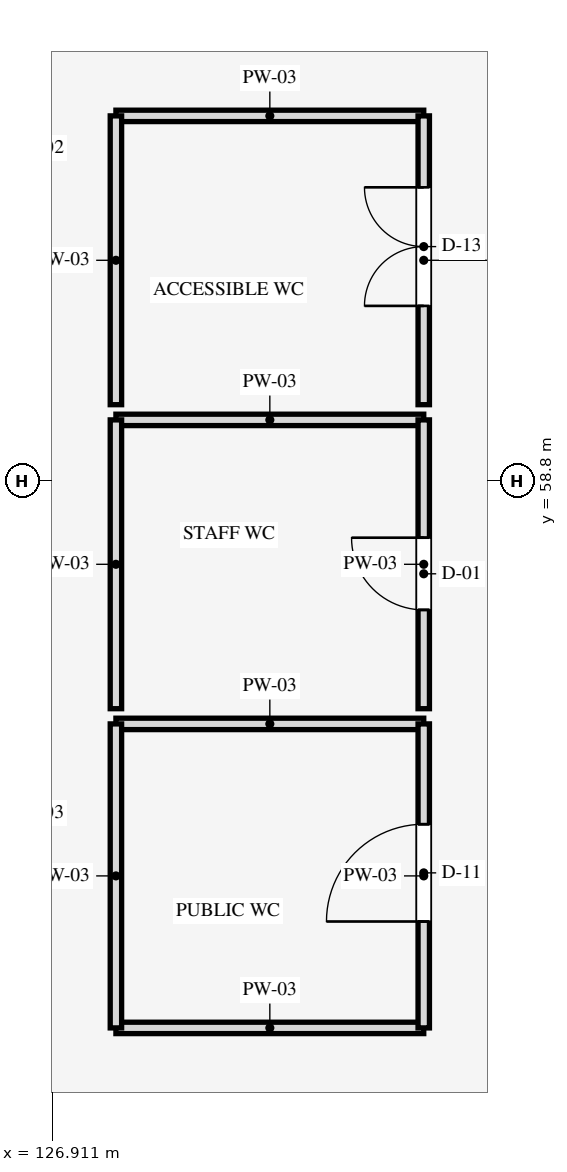
"""IFC4 building model, lengths in metres.
Left out: names, types, materials, properties, quantities, classifications, styles, units other than length and angle.
Written with IfcOpenShell. Run it as: python <this file> out.ifc"""

import sys

from ifc_helpers import new_model, si_unit, direction, frame, frame_2d, origin, place, context, subcontext, project, spatial, rectangle, extrude, element, fill, save


model = new_model("IFC4")
c1 = context("Model", 3, precision=1e-05, world=origin(), true_north=direction((0.0, 1.0)))
c2 = subcontext(c1, "Body", "Model", "MODEL_VIEW")
j1 = project(units=[si_unit("LENGTHUNIT", "METRE"), si_unit("PLANEANGLEUNIT", "RADIAN")], contexts=[c1])
p1 = place(None, origin())
s1 = spatial("IfcSite", under=j1, at=p1, CompositionType="ELEMENT")
p2 = place(p1, origin())
s2 = spatial("IfcBuilding", under=s1, at=p2, CompositionType="ELEMENT")
p3 = place(p2, frame((0.0, 0.0, 32.1)))
s3 = spatial("IfcBuildingStorey", under=s2, at=p3, CompositionType="ELEMENT", Elevation=32.1)
for number, where, z_axis, x_axis in (
    (1, (127.75, 51.6, 0.0), (0.0, 0.0, 1.0), (1.0, 0.0, 0.0)),
    (2, (127.75, 55.6, 0.0), (0.0, 0.0, 1.0), (1.0, 0.0, 0.0)),
):
    element("IfcWall", number, at=place(p3, frame(where, z_axis=z_axis, x_axis=x_axis)), inside=s3, PredefinedType="PARTITIONING", context=c2, shape_type="SweptSolid", body=[
        extrude(rectangle(XDim=4.05, YDim=0.15, at=frame_2d((2.025, 0.0))), origin(), (0.0, 0.0, 1.0), 3.24),
    ])
p4 = place(p3, frame((127.75, 51.6, 0.0), z_axis=(0.0, 0.0, 1.0), x_axis=(0.0, 1.0, 0.0)))
e3 = element("IfcWall", 3, at=p4, inside=s3, PredefinedType="PARTITIONING", context=c2, shape_type="SweptSolid", body=[
    extrude(rectangle(XDim=4.0, YDim=0.15, at=frame_2d((2.0, 0.0))), origin(), (0.0, 0.0, 1.0), 3.24),
])
p5 = place(p3, frame((131.8, 51.6, 0.0), z_axis=(0.0, 0.0, 1.0), x_axis=(0.0, 1.0, 0.0)))
e4 = element("IfcWall", 4, at=p5, inside=s3, PredefinedType="PARTITIONING", context=c2, shape_type="SweptSolid", body=[
    extrude(rectangle(XDim=4.0, YDim=0.15, at=frame_2d((2.0, 0.0))), origin(), (0.0, 0.0, 1.0), 3.24),
])
p6 = place(p5, frame((1.4, 0.0, 0.0)))
e5 = element("IfcOpeningElement", 5, at=p6, cuts=e4, PredefinedType="OPENING", context=c2, shape_type="SweptSolid", body=[
    extrude(rectangle(XDim=1.28, YDim=2.16, at=frame_2d((0.64, 1.08))), frame((0.0, 0.085, 0.0), z_axis=(0.0, -1.0, 0.0), x_axis=(1.0, 0.0, 0.0)), (0.0, 0.0, 1.0), 0.17),
])
p7 = place(p3, frame((127.75, 59.6, 0.0), z_axis=(0.0, 0.0, 1.0), x_axis=(1.0, 0.0, 0.0)))
e6 = element("IfcWall", 6, at=p7, inside=s3, PredefinedType="PARTITIONING", context=c2, shape_type="SweptSolid", body=[
    extrude(rectangle(XDim=4.05, YDim=0.15, at=frame_2d((2.025, 0.0))), origin(), (0.0, 0.0, 1.0), 3.24),
])
p8 = place(p3, frame((127.75, 55.8, 0.0), z_axis=(0.0, 0.0, 1.0), x_axis=(0.0, 1.0, 0.0)))
e7 = element("IfcWall", 7, at=p8, inside=s3, PredefinedType="PARTITIONING", context=c2, shape_type="SweptSolid", body=[
    extrude(rectangle(XDim=3.8, YDim=0.15, at=frame_2d((1.9, 0.0))), origin(), (0.0, 0.0, 1.0), 3.24),
])
p9 = place(p3, frame((131.8, 55.8, 0.0), z_axis=(0.0, 0.0, 1.0), x_axis=(0.0, 1.0, 0.0)))
e8 = element("IfcWall", 8, at=p9, inside=s3, PredefinedType="PARTITIONING", context=c2, shape_type="SweptSolid", body=[
    extrude(rectangle(XDim=3.8, YDim=0.15, at=frame_2d((1.9, 0.0))), origin(), (0.0, 0.0, 1.0), 3.24),
])
p10 = place(p9, frame((1.3, 0.0, 0.0)))
e9 = element("IfcOpeningElement", 9, at=p10, cuts=e8, PredefinedType="OPENING", context=c2, shape_type="SweptSolid", body=[
    extrude(rectangle(XDim=0.95, YDim=2.1, at=frame_2d((0.475, 1.05))), frame((0.0, 0.085, 0.0), z_axis=(0.0, -1.0, 0.0), x_axis=(1.0, 0.0, 0.0)), (0.0, 0.0, 1.0), 0.17),
])
p11 = place(p3, frame((127.75, 63.6, 0.0), z_axis=(0.0, 0.0, 1.0), x_axis=(1.0, 0.0, 0.0)))
e10 = element("IfcWall", 10, at=p11, inside=s3, PredefinedType="PARTITIONING", context=c2, shape_type="SweptSolid", body=[
    extrude(rectangle(XDim=4.05, YDim=0.15, at=frame_2d((2.025, 0.0))), origin(), (0.0, 0.0, 1.0), 3.24),
])
p12 = place(p3, frame((127.75, 59.8, 0.0), z_axis=(0.0, 0.0, 1.0), x_axis=(0.0, 1.0, 0.0)))
e11 = element("IfcWall", 11, at=p12, inside=s3, PredefinedType="PARTITIONING", context=c2, shape_type="SweptSolid", body=[
    extrude(rectangle(XDim=3.8, YDim=0.15, at=frame_2d((1.9, 0.0))), origin(), (0.0, 0.0, 1.0), 3.24),
])
p13 = place(p3, frame((131.8, 59.8, 0.0), z_axis=(0.0, 0.0, 1.0), x_axis=(0.0, 1.0, 0.0)))
e12 = element("IfcWall", 12, at=p13, inside=s3, PredefinedType="PARTITIONING", context=c2, shape_type="SweptSolid", body=[
    extrude(rectangle(XDim=3.8, YDim=0.15, at=frame_2d((1.9, 0.0))), origin(), (0.0, 0.0, 1.0), 3.24),
])
p14 = place(p13, frame((1.3, 0.0, 0.0)))
e13 = element("IfcOpeningElement", 13, at=p14, cuts=e12, PredefinedType="OPENING", context=c2, shape_type="SweptSolid", body=[
    extrude(rectangle(XDim=1.56, YDim=2.2, at=frame_2d((0.78, 1.1))), frame((0.0, 0.085, 0.0), z_axis=(0.0, -1.0, 0.0), x_axis=(1.0, 0.0, 0.0)), (0.0, 0.0, 1.0), 0.17),
])
p15 = place(p6, origin())
e14 = element("IfcDoor", 14, at=p15, inside=s3, OperationType="SINGLE_SWING_LEFT", PredefinedType="DOOR", context=c2, shape_type="SweptSolid", body=[
    extrude(rectangle(XDim=1.28, YDim=2.16, at=frame_2d((0.64, 1.08))), frame((0.0, 0.025, 0.0), z_axis=(0.0, -1.0, 0.0), x_axis=(1.0, 0.0, 0.0)), (0.0, 0.0, 1.0), 0.05),
])
fill(e5, e14)
p16 = place(p10, origin())
e15 = element("IfcDoor", 15, at=p16, inside=s3, OperationType="SINGLE_SWING_RIGHT", PredefinedType="DOOR", context=c2, shape_type="SweptSolid", body=[
    extrude(rectangle(XDim=0.95, YDim=2.1, at=frame_2d((0.475, 1.05))), frame((0.0, 0.025, 0.0), z_axis=(0.0, -1.0, 0.0), x_axis=(1.0, 0.0, 0.0)), (0.0, 0.0, 1.0), 0.05),
])
fill(e9, e15)
p17 = place(p14, origin())
e16 = element("IfcDoor", 16, at=p17, inside=s3, OperationType="DOUBLE_DOOR_SINGLE_SWING", PredefinedType="DOOR", context=c2, shape_type="SweptSolid", body=[
    extrude(rectangle(XDim=1.56, YDim=2.2, at=frame_2d((0.78, 1.1))), frame((0.0, 0.025, 0.0), z_axis=(0.0, -1.0, 0.0), x_axis=(1.0, 0.0, 0.0)), (0.0, 0.0, 1.0), 0.05),
])
fill(e13, e16)
save(model, sys.argv[1])
